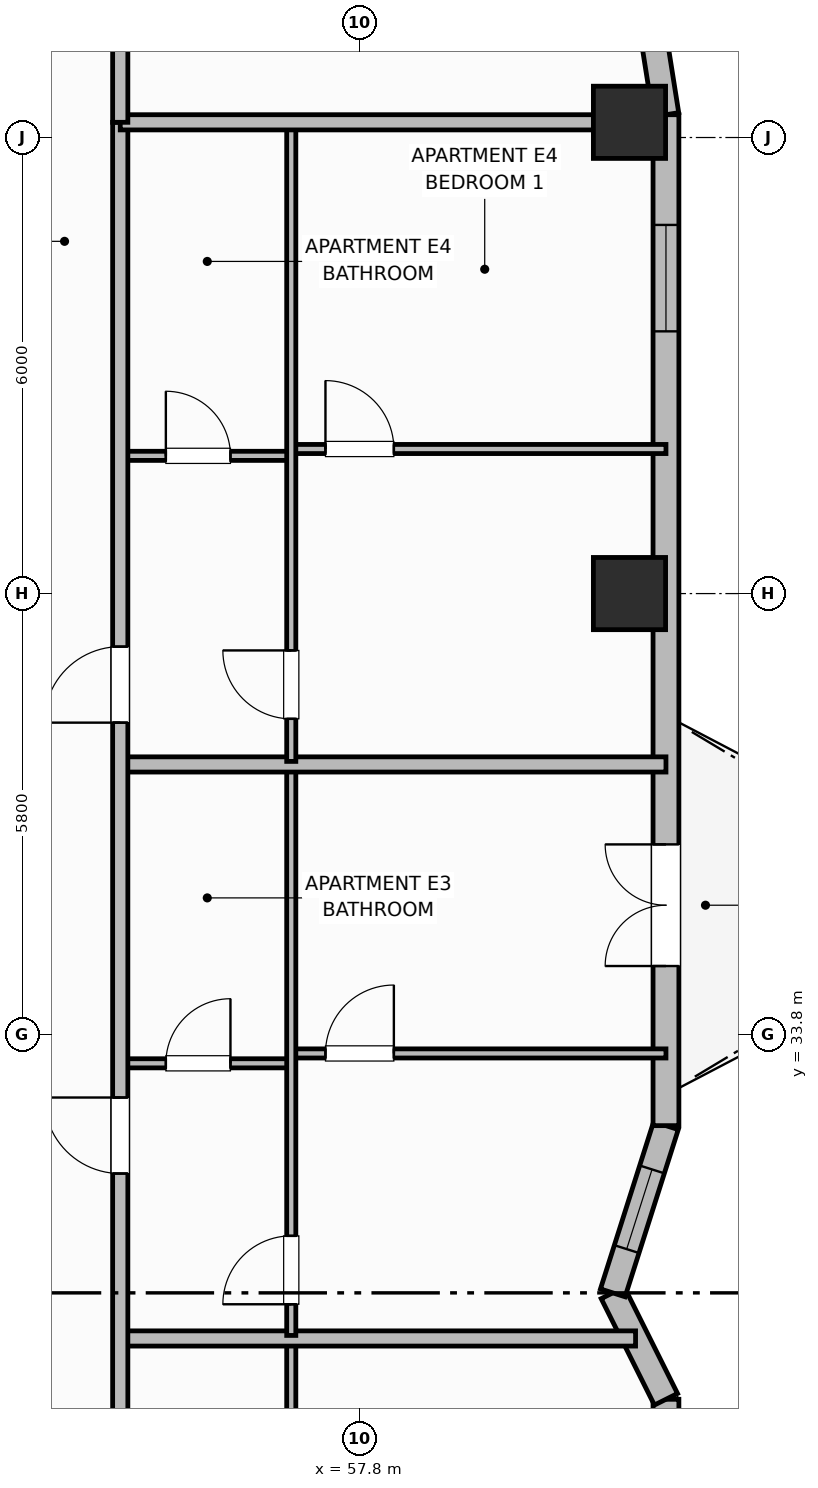
"""IFC4 building model, lengths in metres.
Left out: names, types, materials, properties, quantities, classifications, styles, units other than length and angle.
Written with IfcOpenShell. Run it as: python <this file> out.ifc"""

import sys

from ifc_helpers import new_model, si_unit, direction, frame, frame_2d, origin, origin_2d, place, context, subcontext, project, spatial, rectangle, extrude, element, fill, save


model = new_model("IFC4")
c1 = context("Model", 3, precision=1e-05, world=origin(), true_north=direction((0.0, 1.0)))
c2 = subcontext(c1, "Body", "Model", "MODEL_VIEW")
j1 = project(units=[si_unit("LENGTHUNIT", "METRE"), si_unit("PLANEANGLEUNIT", "RADIAN")], contexts=[c1])
p1 = place(None, origin())
s1 = spatial("IfcSite", under=j1, at=p1, CompositionType="ELEMENT")
p2 = place(p1, origin())
s2 = spatial("IfcBuilding", under=s1, at=p2, CompositionType="ELEMENT")
p3 = place(p2, frame((0.0, 0.0, 181.1)))
s3 = spatial("IfcBuildingStorey", under=s2, at=p3, CompositionType="ELEMENT", Elevation=181.1)
for number, where, z_axis, x_axis in (
    (1, (61.35, 39.6, 0.0), (0.0, 0.0, 1.0), (1.0, 0.0, 0.0)),
    (2, (61.35, 45.8, 0.0), (0.0, 0.0, 1.0), (1.0, 0.0, 0.0)),
):
    element("IfcColumn", number, at=place(p3, frame(where, z_axis=z_axis, x_axis=x_axis)), inside=s3, PredefinedType="COLUMN", context=c2, shape_type="SweptSolid", body=[
        extrude(rectangle(XDim=0.95, YDim=0.95, at=origin_2d()), origin(), (0.0, 0.0, 1.0), 3.7),
    ])
p4 = place(p3, frame((61.83, 27.4, 0.0), z_axis=(0.0, 0.0, 1.0), x_axis=(0.0, 1.0, 0.0)))
e3 = element("IfcWall", 3, at=p4, inside=s3, PredefinedType="SOLIDWALL", context=c2, shape_type="SweptSolid", body=[
    extrude(rectangle(XDim=1.6, YDim=0.34, at=frame_2d((0.8, 0.0))), origin(), (0.0, 0.0, 1.0), 2.72),
])
p5 = place(p3, frame((61.83, 29.0, 0.0), z_axis=(0.0, 0.0, 1.0), x_axis=(-0.447338371726, 0.894364792007, 0.0)))
e4 = element("IfcWall", 4, at=p5, inside=s3, PredefinedType="SOLIDWALL", context=c2, shape_type="SweptSolid", body=[
    extrude(rectangle(XDim=1.565, YDim=0.34, at=frame_2d((0.783, 0.0))), origin(), (0.0, 0.0, 1.0), 2.72),
])
p6 = place(p3, frame((61.13, 30.4, 0.0), z_axis=(0.0, 0.0, 1.0), x_axis=(0.303256029766, 0.952909114454, 0.0)))
e5 = element("IfcWall", 5, at=p6, inside=s3, PredefinedType="SOLIDWALL", context=c2, shape_type="SweptSolid", body=[
    extrude(rectangle(XDim=2.309, YDim=0.34, at=frame_2d((1.154, 0.0))), origin(), (0.0, 0.0, 1.0), 2.72),
])
p7 = place(p6, frame((0.604, 0.0, 0.91)))
e6 = element("IfcOpeningElement", 6, at=p7, cuts=e5, PredefinedType="OPENING", context=c2, shape_type="SweptSolid", body=[
    extrude(rectangle(XDim=1.1, YDim=1.65, at=frame_2d((0.55, 0.825))), frame((0.0, 0.18, 0.0), z_axis=(0.0, -1.0, 0.0), x_axis=(1.0, 0.0, 0.0)), (0.0, 0.0, 1.0), 0.36),
])
p8 = place(p3, frame((61.83, 32.6, 0.0), z_axis=(0.0, 0.0, 1.0), x_axis=(0.0, 1.0, 0.0)))
e7 = element("IfcWall", 7, at=p8, inside=s3, PredefinedType="SOLIDWALL", context=c2, shape_type="SweptSolid", body=[
    extrude(rectangle(XDim=13.3, YDim=0.34, at=frame_2d((6.65, 0.0))), origin(), (0.0, 0.0, 1.0), 2.72),
])
p9 = place(p8, frame((2.1, 0.0, 0.0)))
e8 = element("IfcOpeningElement", 8, at=p9, cuts=e7, PredefinedType="OPENING", context=c2, shape_type="SweptSolid", body=[
    extrude(rectangle(XDim=1.6, YDim=2.1, at=frame_2d((0.8, 1.05))), frame((0.0, 0.18, 0.0), z_axis=(0.0, -1.0, 0.0), x_axis=(1.0, 0.0, 0.0)), (0.0, 0.0, 1.0), 0.36),
])
p10 = place(p8, frame((10.45, 0.0, 0.75)))
e9 = element("IfcOpeningElement", 9, at=p10, cuts=e7, PredefinedType="OPENING", context=c2, shape_type="SweptSolid", body=[
    extrude(rectangle(XDim=1.4, YDim=1.85, at=frame_2d((0.7, 0.925))), frame((0.0, 0.18, 0.0), z_axis=(0.0, -1.0, 0.0), x_axis=(1.0, 0.0, 0.0)), (0.0, 0.0, 1.0), 0.36),
])
p11 = place(p3, frame((61.83, 45.9, 0.0), z_axis=(0.0, 0.0, 1.0), x_axis=(-0.156481329164, 0.987680916907, 0.0)))
e10 = element("IfcWall", 10, at=p11, inside=s3, PredefinedType="SOLIDWALL", context=c2, shape_type="SweptSolid", body=[
    extrude(rectangle(XDim=1.136, YDim=0.34, at=frame_2d((0.568, 0.0))), origin(), (0.0, 0.0, 1.0), 2.72),
])
p12 = place(p3, frame((56.9, 19.792, 0.0), z_axis=(0.0, 0.0, 1.0), x_axis=(0.0, 1.0, 0.0)))
e11 = element("IfcWall", 11, at=p12, inside=s3, PredefinedType="PARTITIONING", context=c2, shape_type="SweptSolid", body=[
    extrude(rectangle(XDim=9.968, YDim=0.12, at=frame_2d((4.984, 0.0))), origin(), (0.0, 0.0, 1.0), 2.55),
])
p13 = place(p12, frame((0.41, 0.0, 0.0)))
e12 = element("IfcOpeningElement", 12, at=p13, cuts=e11, PredefinedType="OPENING", context=c2, shape_type="SweptSolid", body=[
    extrude(rectangle(XDim=0.9, YDim=2.1, at=frame_2d((0.45, 1.05))), frame((0.0, 0.07, 0.0), z_axis=(0.0, -1.0, 0.0), x_axis=(1.0, 0.0, 0.0)), (0.0, 0.0, 1.0), 0.14),
])
p14 = place(p3, frame((54.65, 29.8, 0.0), z_axis=(0.0, 0.0, 1.0), x_axis=(1.0, 0.0, 0.0)))
e13 = element("IfcWall", 13, at=p14, inside=s3, PredefinedType="PARTITIONING", context=c2, shape_type="SweptSolid", body=[
    extrude(rectangle(XDim=6.78, YDim=0.2, at=frame_2d((3.39, 0.0))), origin(), (0.0, 0.0, 1.0), 2.55),
])
p15 = place(p3, frame((54.65, 33.42, 0.0), z_axis=(0.0, 0.0, 1.0), x_axis=(1.0, 0.0, 0.0)))
e14 = element("IfcWall", 14, at=p15, inside=s3, PredefinedType="PARTITIONING", context=c2, shape_type="SweptSolid", body=[
    extrude(rectangle(XDim=2.25, YDim=0.12, at=frame_2d((1.125, 0.0))), origin(), (0.0, 0.0, 1.0), 2.55),
])
p16 = place(p15, frame((0.6, 0.0, 0.0)))
e15 = element("IfcOpeningElement", 15, at=p16, cuts=e14, PredefinedType="OPENING", context=c2, shape_type="SweptSolid", body=[
    extrude(rectangle(XDim=0.85, YDim=2.1, at=frame_2d((0.425, 1.05))), frame((0.0, 0.07, 0.0), z_axis=(0.0, -1.0, 0.0), x_axis=(1.0, 0.0, 0.0)), (0.0, 0.0, 1.0), 0.14),
])
p17 = place(p3, frame((56.9, 33.55, 0.0), z_axis=(0.0, 0.0, 1.0), x_axis=(1.0, 0.0, 0.0)))
e16 = element("IfcWall", 16, at=p17, inside=s3, PredefinedType="PARTITIONING", context=c2, shape_type="SweptSolid", body=[
    extrude(rectangle(XDim=4.93, YDim=0.12, at=frame_2d((2.465, 0.0))), origin(), (0.0, 0.0, 1.0), 2.55),
])
p18 = place(p17, frame((0.45, 0.0, 0.0)))
e17 = element("IfcOpeningElement", 17, at=p18, cuts=e16, PredefinedType="OPENING", context=c2, shape_type="SweptSolid", body=[
    extrude(rectangle(XDim=0.9, YDim=2.1, at=frame_2d((0.45, 1.05))), frame((0.0, 0.07, 0.0), z_axis=(0.0, -1.0, 0.0), x_axis=(1.0, 0.0, 0.0)), (0.0, 0.0, 1.0), 0.14),
])
p19 = place(p3, frame((56.9, 29.84, 0.0), z_axis=(0.0, 0.0, 1.0), x_axis=(0.0, 1.0, 0.0)))
e18 = element("IfcWall", 18, at=p19, inside=s3, PredefinedType="PARTITIONING", context=c2, shape_type="SweptSolid", body=[
    extrude(rectangle(XDim=7.472, YDim=0.12, at=frame_2d((3.736, 0.0))), origin(), (0.0, 0.0, 1.0), 2.55),
])
p20 = place(p19, frame((0.41, 0.0, 0.0)))
e19 = element("IfcOpeningElement", 19, at=p20, cuts=e18, PredefinedType="OPENING", context=c2, shape_type="SweptSolid", body=[
    extrude(rectangle(XDim=0.9, YDim=2.1, at=frame_2d((0.45, 1.05))), frame((0.0, 0.07, 0.0), z_axis=(0.0, -1.0, 0.0), x_axis=(1.0, 0.0, 0.0)), (0.0, 0.0, 1.0), 0.14),
])
p21 = place(p3, frame((54.65, 37.352, 0.0), z_axis=(0.0, 0.0, 1.0), x_axis=(1.0, 0.0, 0.0)))
e20 = element("IfcWall", 20, at=p21, inside=s3, PredefinedType="PARTITIONING", context=c2, shape_type="SweptSolid", body=[
    extrude(rectangle(XDim=7.18, YDim=0.2, at=frame_2d((3.59, 0.0))), origin(), (0.0, 0.0, 1.0), 2.55),
])
p22 = place(p3, frame((54.65, 41.412, 0.0), z_axis=(0.0, 0.0, 1.0), x_axis=(1.0, 0.0, 0.0)))
e21 = element("IfcWall", 21, at=p22, inside=s3, PredefinedType="PARTITIONING", context=c2, shape_type="SweptSolid", body=[
    extrude(rectangle(XDim=2.25, YDim=0.12, at=frame_2d((1.125, 0.0))), origin(), (0.0, 0.0, 1.0), 2.55),
])
p23 = place(p22, frame((0.6, 0.0, 0.0)))
e22 = element("IfcOpeningElement", 22, at=p23, cuts=e21, PredefinedType="OPENING", context=c2, shape_type="SweptSolid", body=[
    extrude(rectangle(XDim=0.85, YDim=2.1, at=frame_2d((0.425, 1.05))), frame((0.0, 0.07, 0.0), z_axis=(0.0, -1.0, 0.0), x_axis=(1.0, 0.0, 0.0)), (0.0, 0.0, 1.0), 0.14),
])
p24 = place(p3, frame((56.9, 41.502, 0.0), z_axis=(0.0, 0.0, 1.0), x_axis=(1.0, 0.0, 0.0)))
e23 = element("IfcWall", 23, at=p24, inside=s3, PredefinedType="PARTITIONING", context=c2, shape_type="SweptSolid", body=[
    extrude(rectangle(XDim=4.93, YDim=0.12, at=frame_2d((2.465, 0.0))), origin(), (0.0, 0.0, 1.0), 2.55),
])
p25 = place(p24, frame((0.45, 0.0, 0.0)))
e24 = element("IfcOpeningElement", 24, at=p25, cuts=e23, PredefinedType="OPENING", context=c2, shape_type="SweptSolid", body=[
    extrude(rectangle(XDim=0.9, YDim=2.1, at=frame_2d((0.45, 1.05))), frame((0.0, 0.07, 0.0), z_axis=(0.0, -1.0, 0.0), x_axis=(1.0, 0.0, 0.0)), (0.0, 0.0, 1.0), 0.14),
])
p26 = place(p3, frame((56.9, 37.392, 0.0), z_axis=(0.0, 0.0, 1.0), x_axis=(0.0, 1.0, 0.0)))
e25 = element("IfcWall", 25, at=p26, inside=s3, PredefinedType="PARTITIONING", context=c2, shape_type="SweptSolid", body=[
    extrude(rectangle(XDim=8.368, YDim=0.12, at=frame_2d((4.184, 0.0))), origin(), (0.0, 0.0, 1.0), 2.55),
])
p27 = place(p26, frame((0.56, 0.0, 0.0)))
e26 = element("IfcOpeningElement", 26, at=p27, cuts=e25, PredefinedType="OPENING", context=c2, shape_type="SweptSolid", body=[
    extrude(rectangle(XDim=0.9, YDim=2.1, at=frame_2d((0.45, 1.05))), frame((0.0, 0.07, 0.0), z_axis=(0.0, -1.0, 0.0), x_axis=(1.0, 0.0, 0.0)), (0.0, 0.0, 1.0), 0.14),
])
p28 = place(p3, frame((54.65, 10.6, 0.0), z_axis=(0.0, 0.0, 1.0), x_axis=(0.0, 1.0, 0.0)))
e27 = element("IfcWall", 27, at=p28, inside=s3, PredefinedType="PARTITIONING", context=c2, shape_type="SweptSolid", body=[
    extrude(rectangle(XDim=35.2, YDim=0.2, at=frame_2d((17.6, 0.0))), origin(), (0.0, 0.0, 1.0), 2.55),
])
p29 = place(p28, frame((2.65, 0.0, 0.0)))
e28 = element("IfcOpeningElement", 28, at=p29, cuts=e27, PredefinedType="OPENING", context=c2, shape_type="SweptSolid", body=[
    extrude(rectangle(XDim=1.0, YDim=2.15, at=frame_2d((0.5, 1.075))), frame((0.0, 0.11, 0.0), z_axis=(0.0, -1.0, 0.0), x_axis=(1.0, 0.0, 0.0)), (0.0, 0.0, 1.0), 0.22),
])
p30 = place(p28, frame((11.352, 0.0, 0.0)))
e29 = element("IfcOpeningElement", 29, at=p30, cuts=e27, PredefinedType="OPENING", context=c2, shape_type="SweptSolid", body=[
    extrude(rectangle(XDim=1.0, YDim=2.15, at=frame_2d((0.5, 1.075))), frame((0.0, 0.11, 0.0), z_axis=(0.0, -1.0, 0.0), x_axis=(1.0, 0.0, 0.0)), (0.0, 0.0, 1.0), 0.22),
])
p31 = place(p28, frame((21.37, 0.0, 0.0)))
e30 = element("IfcOpeningElement", 30, at=p31, cuts=e27, PredefinedType="OPENING", context=c2, shape_type="SweptSolid", body=[
    extrude(rectangle(XDim=1.0, YDim=2.15, at=frame_2d((0.5, 1.075))), frame((0.0, 0.11, 0.0), z_axis=(0.0, -1.0, 0.0), x_axis=(1.0, 0.0, 0.0)), (0.0, 0.0, 1.0), 0.22),
])
p32 = place(p28, frame((27.302, 0.0, 0.0)))
e31 = element("IfcOpeningElement", 31, at=p32, cuts=e27, PredefinedType="OPENING", context=c2, shape_type="SweptSolid", body=[
    extrude(rectangle(XDim=1.0, YDim=2.15, at=frame_2d((0.5, 1.075))), frame((0.0, 0.11, 0.0), z_axis=(0.0, -1.0, 0.0), x_axis=(1.0, 0.0, 0.0)), (0.0, 0.0, 1.0), 0.22),
])
p33 = place(p3, frame((54.65, 45.8, 0.0), z_axis=(0.0, 0.0, 1.0), x_axis=(1.0, 0.0, 0.0)))
e32 = element("IfcWall", 32, at=p33, inside=s3, PredefinedType="PARTITIONING", context=c2, shape_type="SweptSolid", body=[
    extrude(rectangle(XDim=6.76, YDim=0.2, at=frame_2d((3.38, 0.0))), origin(), (0.0, 0.0, 1.0), 2.55),
])
p34 = place(p3, frame((54.65, 45.8, 0.0), z_axis=(0.0, 0.0, 1.0), x_axis=(0.0, 1.0, 0.0)))
e33 = element("IfcWall", 33, at=p34, inside=s3, PredefinedType="PARTITIONING", context=c2, shape_type="SweptSolid", body=[
    extrude(rectangle(XDim=3.73, YDim=0.2, at=frame_2d((1.865, 0.0))), origin(), (0.0, 0.0, 1.0), 2.55),
])
p35 = place(p7, origin())
e34 = element("IfcWindow", 34, at=p35, inside=s3, PartitioningType="SINGLE_PANEL", PredefinedType="WINDOW", context=c2, shape_type="SweptSolid", body=[
    extrude(rectangle(XDim=1.1, YDim=1.65, at=frame_2d((0.55, 0.825))), frame((0.0, 0.03, 0.0), z_axis=(0.0, -1.0, 0.0), x_axis=(1.0, 0.0, 0.0)), (0.0, 0.0, 1.0), 0.06),
])
fill(e6, e34)
p36 = place(p9, origin())
e35 = element("IfcDoor", 35, at=p36, inside=s3, OperationType="DOUBLE_DOOR_SINGLE_SWING", PredefinedType="DOOR", context=c2, shape_type="SweptSolid", body=[
    extrude(rectangle(XDim=1.6, YDim=2.1, at=frame_2d((0.8, 1.05))), frame((0.0, 0.025, 0.0), z_axis=(0.0, -1.0, 0.0), x_axis=(1.0, 0.0, 0.0)), (0.0, 0.0, 1.0), 0.05),
])
fill(e8, e35)
p37 = place(p10, origin())
e36 = element("IfcWindow", 36, at=p37, inside=s3, PartitioningType="SINGLE_PANEL", PredefinedType="WINDOW", context=c2, shape_type="SweptSolid", body=[
    extrude(rectangle(XDim=1.4, YDim=1.85, at=frame_2d((0.7, 0.925))), frame((0.0, 0.03, 0.0), z_axis=(0.0, -1.0, 0.0), x_axis=(1.0, 0.0, 0.0)), (0.0, 0.0, 1.0), 0.06),
])
fill(e9, e36)
p38 = place(p16, origin())
e37 = element("IfcDoor", 37, at=p38, inside=s3, OperationType="SINGLE_SWING_RIGHT", PredefinedType="DOOR", context=c2, shape_type="SweptSolid", body=[
    extrude(rectangle(XDim=0.85, YDim=2.1, at=frame_2d((0.425, 1.05))), frame((0.0, 0.025, 0.0), z_axis=(0.0, -1.0, 0.0), x_axis=(1.0, 0.0, 0.0)), (0.0, 0.0, 1.0), 0.05),
])
fill(e15, e37)
p39 = place(p18, origin())
e38 = element("IfcDoor", 38, at=p39, inside=s3, OperationType="SINGLE_SWING_RIGHT", PredefinedType="DOOR", context=c2, shape_type="SweptSolid", body=[
    extrude(rectangle(XDim=0.9, YDim=2.1, at=frame_2d((0.45, 1.05))), frame((0.0, 0.025, 0.0), z_axis=(0.0, -1.0, 0.0), x_axis=(1.0, 0.0, 0.0)), (0.0, 0.0, 1.0), 0.05),
])
fill(e17, e38)
p40 = place(p20, origin())
e39 = element("IfcDoor", 39, at=p40, inside=s3, OperationType="SINGLE_SWING_LEFT", PredefinedType="DOOR", context=c2, shape_type="SweptSolid", body=[
    extrude(rectangle(XDim=0.9, YDim=2.1, at=frame_2d((0.45, 1.05))), frame((0.0, 0.025, 0.0), z_axis=(0.0, -1.0, 0.0), x_axis=(1.0, 0.0, 0.0)), (0.0, 0.0, 1.0), 0.05),
])
fill(e19, e39)
p41 = place(p23, origin())
e40 = element("IfcDoor", 40, at=p41, inside=s3, OperationType="SINGLE_SWING_LEFT", PredefinedType="DOOR", context=c2, shape_type="SweptSolid", body=[
    extrude(rectangle(XDim=0.85, YDim=2.1, at=frame_2d((0.425, 1.05))), frame((0.0, 0.025, 0.0), z_axis=(0.0, -1.0, 0.0), x_axis=(1.0, 0.0, 0.0)), (0.0, 0.0, 1.0), 0.05),
])
fill(e22, e40)
p42 = place(p25, origin())
e41 = element("IfcDoor", 41, at=p42, inside=s3, OperationType="SINGLE_SWING_LEFT", PredefinedType="DOOR", context=c2, shape_type="SweptSolid", body=[
    extrude(rectangle(XDim=0.9, YDim=2.1, at=frame_2d((0.45, 1.05))), frame((0.0, 0.025, 0.0), z_axis=(0.0, -1.0, 0.0), x_axis=(1.0, 0.0, 0.0)), (0.0, 0.0, 1.0), 0.05),
])
fill(e24, e41)
p43 = place(p27, origin())
e42 = element("IfcDoor", 42, at=p43, inside=s3, OperationType="SINGLE_SWING_RIGHT", PredefinedType="DOOR", context=c2, shape_type="SweptSolid", body=[
    extrude(rectangle(XDim=0.9, YDim=2.1, at=frame_2d((0.45, 1.05))), frame((0.0, 0.025, 0.0), z_axis=(0.0, -1.0, 0.0), x_axis=(1.0, 0.0, 0.0)), (0.0, 0.0, 1.0), 0.05),
])
fill(e26, e42)
p44 = place(p31, origin())
e43 = element("IfcDoor", 43, at=p44, inside=s3, OperationType="SINGLE_SWING_RIGHT", PredefinedType="DOOR", context=c2, shape_type="SweptSolid", body=[
    extrude(rectangle(XDim=1.0, YDim=2.15, at=frame_2d((0.5, 1.075))), frame((0.0, 0.025, 0.0), z_axis=(0.0, -1.0, 0.0), x_axis=(1.0, 0.0, 0.0)), (0.0, 0.0, 1.0), 0.05),
])
fill(e30, e43)
p45 = place(p32, origin())
e44 = element("IfcDoor", 44, at=p45, inside=s3, OperationType="SINGLE_SWING_LEFT", PredefinedType="DOOR", context=c2, shape_type="SweptSolid", body=[
    extrude(rectangle(XDim=1.0, YDim=2.15, at=frame_2d((0.5, 1.075))), frame((0.0, 0.025, 0.0), z_axis=(0.0, -1.0, 0.0), x_axis=(1.0, 0.0, 0.0)), (0.0, 0.0, 1.0), 0.05),
])
fill(e31, e44)
save(model, sys.argv[1])
